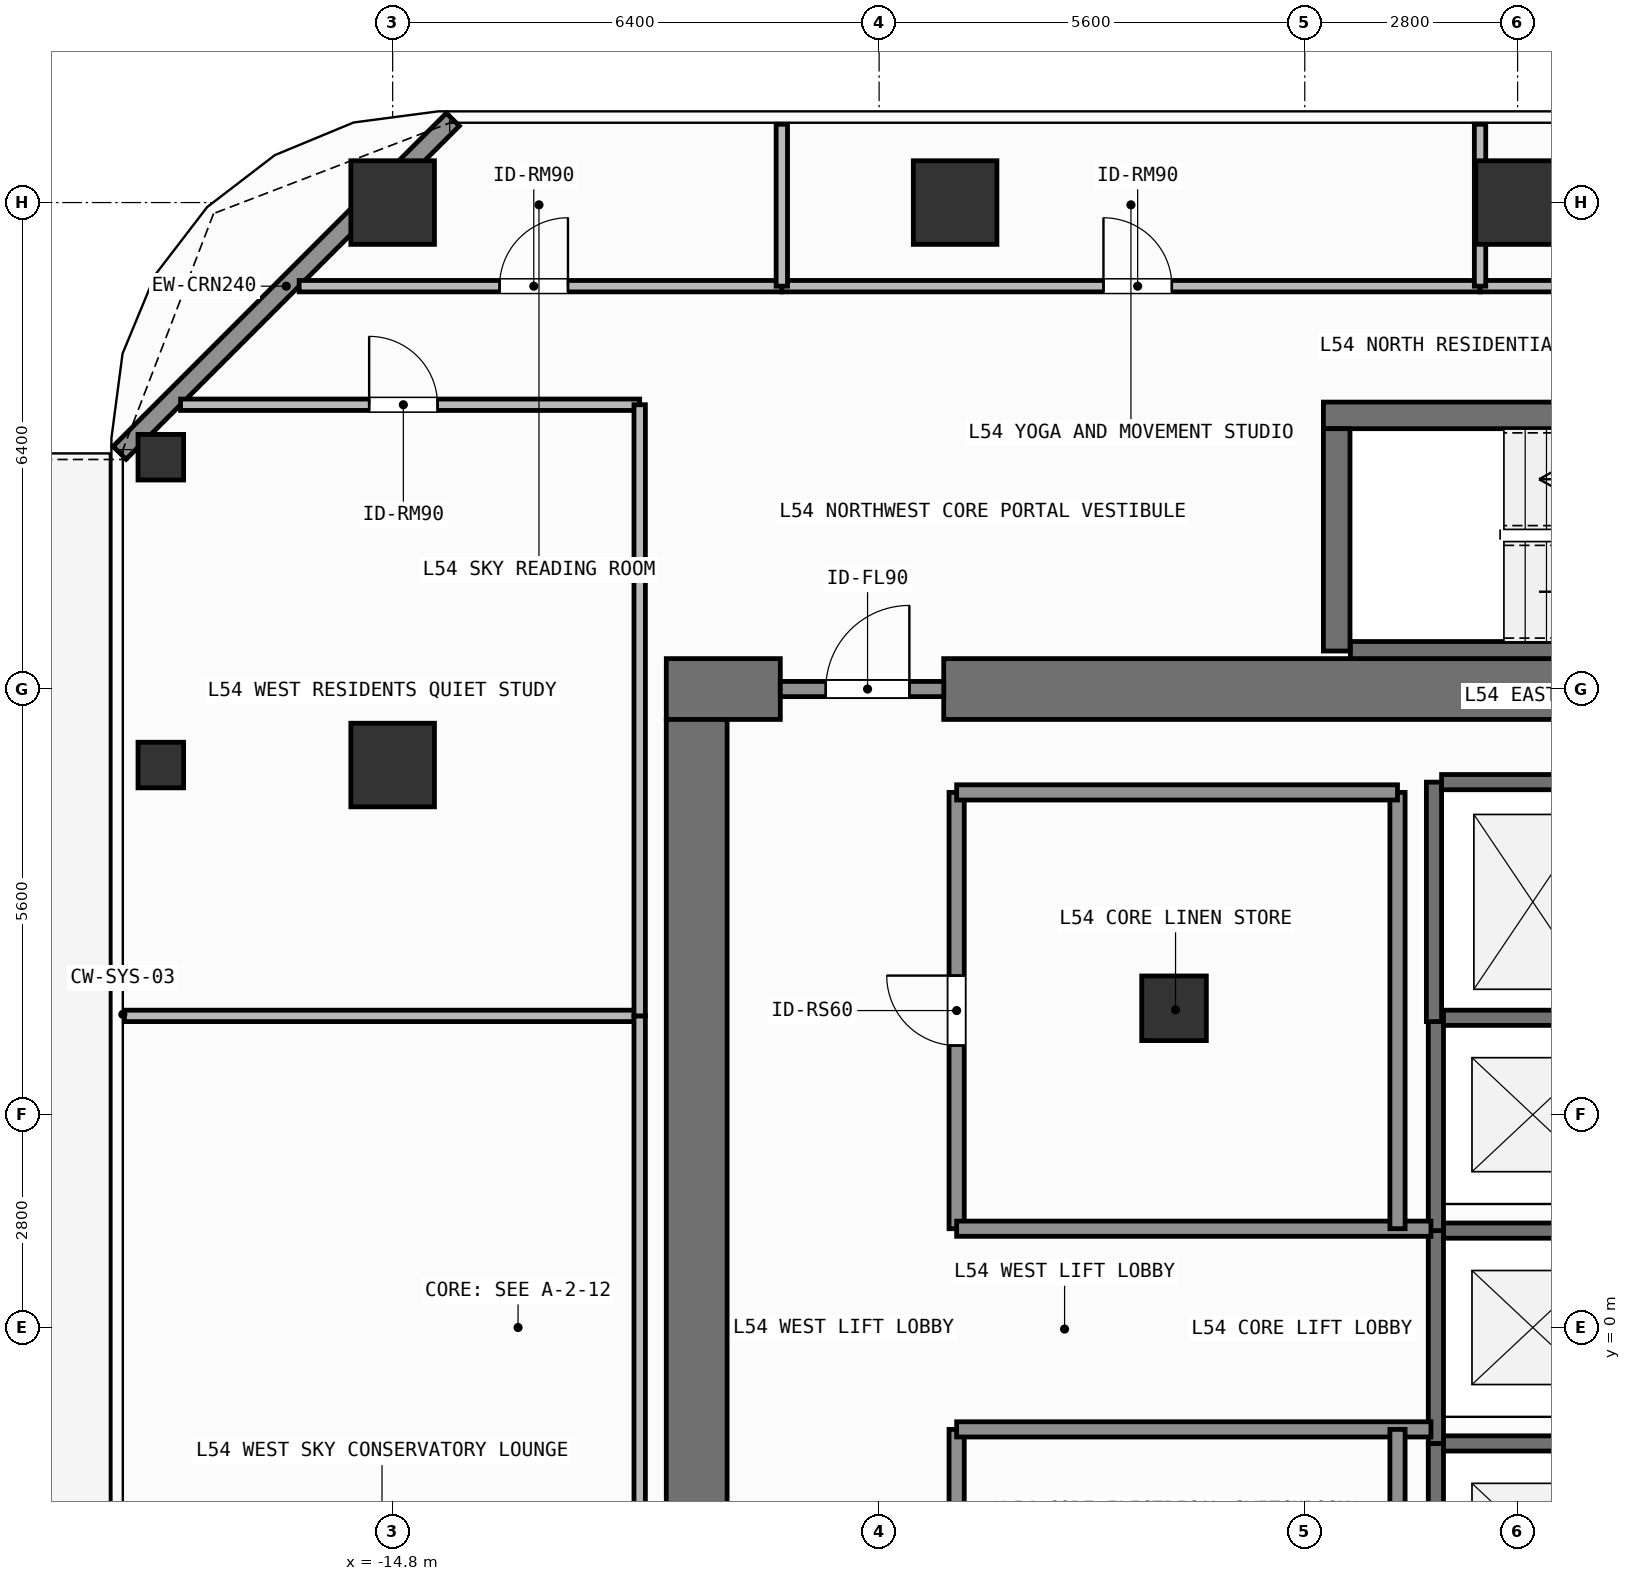
"""IFC4 building model, lengths in metres.
Left out: names, types, materials, properties, quantities, classifications, styles, units other than length and angle.
Written with IfcOpenShell. Run it as: python <this file> out.ifc"""

import sys

from ifc_helpers import new_model, si_unit, direction, frame, frame_2d, origin, origin_2d, place, context, subcontext, project, spatial, rectangle, hollow_rectangle, extrude, element, fill, save


model = new_model("IFC4")
c1 = context("Model", 3, precision=1e-05, world=origin(), true_north=direction((0.0, 1.0)))
c2 = subcontext(c1, "Body", "Model", "MODEL_VIEW")
j1 = project(units=[si_unit("LENGTHUNIT", "METRE"), si_unit("PLANEANGLEUNIT", "RADIAN")], contexts=[c1])
p1 = place(None, origin())
s1 = spatial("IfcSite", under=j1, at=p1, CompositionType="ELEMENT")
p2 = place(p1, origin())
s2 = spatial("IfcBuilding", under=s1, at=p2, CompositionType="ELEMENT")
p3 = place(p2, frame((0.0, 0.0, 219.6)))
s3 = spatial("IfcBuildingStorey", under=s2, at=p3, CompositionType="ELEMENT", Elevation=219.6)
p4 = place(p3, frame((-11.2, 8.4, 0.0), z_axis=(0.0, 0.0, 1.0), x_axis=(1.0, 0.0, 0.0)))
e1 = element("IfcWall", 1, at=p4, inside=s3, PredefinedType="SHEAR", context=c2, shape_type="SweptSolid", body=[
    extrude(rectangle(XDim=1.5, YDim=0.8, at=frame_2d((0.75, 0.0))), origin(), (0.0, 0.0, 1.0), 3.9),
])
p5 = place(p3, frame((-7.55, 8.4, 0.0), z_axis=(0.0, 0.0, 1.0), x_axis=(1.0, 0.0, 0.0)))
e2 = element("IfcWall", 2, at=p5, inside=s3, PredefinedType="SHEAR", context=c2, shape_type="SweptSolid", body=[
    extrude(rectangle(XDim=16.35, YDim=0.8, at=frame_2d((8.175, 0.0))), origin(), (0.0, 0.0, 1.0), 3.9),
])
p6 = place(p3, frame((-10.8, -8.0, 0.0), z_axis=(0.0, 0.0, 1.0), x_axis=(0.0, 1.0, 0.0)))
e3 = element("IfcWall", 3, at=p6, inside=s3, PredefinedType="SHEAR", context=c2, shape_type="SweptSolid", body=[
    extrude(rectangle(XDim=16.0, YDim=0.8, at=frame_2d((8.0, 0.0))), origin(), (0.0, 0.0, 1.0), 3.9),
])
p7 = place(p3, frame((-2.555, 12.0, 0.0), z_axis=(0.0, 0.0, 1.0), x_axis=(1.0, 0.0, 0.0)))
e4 = element("IfcWall", 4, at=p7, inside=s3, PredefinedType="SHEAR", context=c2, shape_type="SweptSolid", body=[
    extrude(rectangle(XDim=7.31, YDim=0.35, at=frame_2d((3.655, 0.0))), origin(), (0.0, 0.0, 1.0), 3.9),
])
p8 = place(p3, frame((-2.2, 8.913, 0.0), z_axis=(0.0, 0.0, 1.0), x_axis=(1.0, 0.0, 0.0)))
e5 = element("IfcWall", 5, at=p8, inside=s3, PredefinedType="SHEAR", context=c2, shape_type="SweptSolid", body=[
    extrude(rectangle(XDim=6.6, YDim=0.225, at=frame_2d((3.3, 0.0))), origin(), (0.0, 0.0, 1.0), 3.9),
])
p9 = place(p3, frame((-2.38, 8.9, 0.0), z_axis=(0.0, 0.0, 1.0), x_axis=(0.0, 1.0, 0.0)))
e6 = element("IfcWall", 6, at=p9, inside=s3, PredefinedType="SHEAR", context=c2, shape_type="SweptSolid", body=[
    extrude(rectangle(XDim=2.925, YDim=0.35, at=frame_2d((1.462, 0.0))), origin(), (0.0, 0.0, 1.0), 3.9),
])
for number, where, z_axis, x_axis in (
    (7, (-14.8, 14.8, 0.0), (0.0, 0.0, 1.0), (1.0, 0.0, 0.0)),
    (8, (-7.4, 14.8, 0.0), (0.0, 0.0, 1.0), (1.0, 0.0, 0.0)),
    (9, (0.0, 14.8, 0.0), (0.0, 0.0, 1.0), (1.0, 0.0, 0.0)),
    (10, (-14.8, 7.4, 0.0), (0.0, 0.0, 1.0), (1.0, 0.0, 0.0)),
):
    element("IfcColumn", number, at=place(p3, frame(where, z_axis=z_axis, x_axis=x_axis)), inside=s3, PredefinedType="COLUMN", context=c2, shape_type="SweptSolid", body=[
        extrude(rectangle(XDim=1.1, YDim=1.1, at=origin_2d()), origin(), (0.0, 0.0, 1.0), 3.9),
    ])
p10 = place(p3, frame((-4.52, 4.2, 0.0), z_axis=(0.0, 0.0, 1.0), x_axis=(1.0, 0.0, 0.0)))
e11 = element("IfcColumn", 11, at=p10, inside=s3, PredefinedType="COLUMN", context=c2, shape_type="SweptSolid", body=[
    extrude(rectangle(XDim=0.85, YDim=0.85, at=origin_2d()), origin(), (0.0, 0.0, 1.0), 3.9),
])
for number, where, z_axis, x_axis in (
    (12, (-17.85, 11.45, 0.0), (0.0, 0.0, 1.0), (1.0, 0.0, 0.0)),
    (13, (-17.85, 7.4, 0.0), (0.0, 0.0, 1.0), (1.0, 0.0, 0.0)),
):
    element("IfcColumn", number, at=place(p3, frame(where, z_axis=z_axis, x_axis=x_axis)), inside=s3, PredefinedType="COLUMN", context=c2, shape_type="SweptSolid", body=[
        extrude(hollow_rectangle(XDim=0.6, YDim=0.6, WallThickness=0.028, at=origin_2d()), origin(), (0.0, 0.0, 1.0), 3.9),
    ])
p11 = place(p3, frame((-18.392, 11.508, 0.0), z_axis=(0.0, 0.0, 1.0), x_axis=(0.707106781187, 0.707106781187, 0.0)))
e14 = element("IfcWall", 14, at=p11, inside=s3, PredefinedType="SOLIDWALL", context=c2, shape_type="SweptSolid", body=[
    extrude(rectangle(XDim=6.201, YDim=0.24, at=frame_2d((3.101, 0.0))), origin(), (0.0, 0.0, 1.0), 3.68),
])
p12 = place(p3, frame((-1.075, -4.275, 0.0), z_axis=(0.0, 0.0, 1.0), x_axis=(0.0, 1.0, 0.0)))
e15 = element("IfcWall", 15, at=p12, inside=s3, PredefinedType="SHEAR", context=c2, shape_type="SweptSolid", body=[
    extrude(rectangle(XDim=2.75, YDim=0.2, at=frame_2d((1.375, 0.0))), origin(), (0.0, 0.0, 1.0), 3.68),
])
p13 = place(p3, frame((-0.975, -1.525, 0.0), z_axis=(0.0, 0.0, 1.0), x_axis=(1.0, 0.0, 0.0)))
e16 = element("IfcWall", 16, at=p13, inside=s3, PredefinedType="SHEAR", context=c2, shape_type="SweptSolid", body=[
    extrude(rectangle(XDim=2.35, YDim=0.2, at=frame_2d((1.175, 0.0))), origin(), (0.0, 0.0, 1.0), 3.68),
])
p14 = place(p3, frame((-1.075, -1.525, 0.0), z_axis=(0.0, 0.0, 1.0), x_axis=(0.0, 1.0, 0.0)))
e17 = element("IfcWall", 17, at=p14, inside=s3, PredefinedType="SHEAR", context=c2, shape_type="SweptSolid", body=[
    extrude(rectangle(XDim=2.8, YDim=0.2, at=frame_2d((1.4, 0.0))), origin(), (0.0, 0.0, 1.0), 3.68),
])
p15 = place(p3, frame((-0.975, 1.275, 0.0), z_axis=(0.0, 0.0, 1.0), x_axis=(1.0, 0.0, 0.0)))
e18 = element("IfcWall", 18, at=p15, inside=s3, PredefinedType="SHEAR", context=c2, shape_type="SweptSolid", body=[
    extrude(rectangle(XDim=2.35, YDim=0.2, at=frame_2d((1.175, 0.0))), origin(), (0.0, 0.0, 1.0), 3.68),
])
p16 = place(p3, frame((-1.075, 1.275, 0.0), z_axis=(0.0, 0.0, 1.0), x_axis=(0.0, 1.0, 0.0)))
e19 = element("IfcWall", 19, at=p16, inside=s3, PredefinedType="SHEAR", context=c2, shape_type="SweptSolid", body=[
    extrude(rectangle(XDim=2.8, YDim=0.2, at=frame_2d((1.4, 0.0))), origin(), (0.0, 0.0, 1.0), 3.68),
])
p17 = place(p3, frame((-0.975, 4.075, 0.0), z_axis=(0.0, 0.0, 1.0), x_axis=(1.0, 0.0, 0.0)))
e20 = element("IfcWall", 20, at=p17, inside=s3, PredefinedType="SHEAR", context=c2, shape_type="SweptSolid", body=[
    extrude(rectangle(XDim=2.35, YDim=0.2, at=frame_2d((1.175, 0.0))), origin(), (0.0, 0.0, 1.0), 3.68),
])
p18 = place(p3, frame((-1.1, 4.025, 0.0), z_axis=(0.0, 0.0, 1.0), x_axis=(0.0, 1.0, 0.0)))
e21 = element("IfcWall", 21, at=p18, inside=s3, PredefinedType="SHEAR", context=c2, shape_type="SweptSolid", body=[
    extrude(rectangle(XDim=3.15, YDim=0.2, at=frame_2d((1.575, 0.0))), origin(), (0.0, 0.0, 1.0), 3.68),
])
p19 = place(p3, frame((-1.0, 7.175, 0.0), z_axis=(0.0, 0.0, 1.0), x_axis=(1.0, 0.0, 0.0)))
e22 = element("IfcWall", 22, at=p19, inside=s3, PredefinedType="SHEAR", context=c2, shape_type="SweptSolid", body=[
    extrude(rectangle(XDim=2.4, YDim=0.2, at=frame_2d((1.2, 0.0))), origin(), (0.0, 0.0, 1.0), 3.68),
])
p20 = place(p3, frame((-9.7, 8.4, 0.0), z_axis=(0.0, 0.0, 1.0), x_axis=(1.0, 0.0, 0.0)))
e23 = element("IfcWall", 23, at=p20, inside=s3, PredefinedType="SOLIDWALL", context=c2, shape_type="SweptSolid", body=[
    extrude(rectangle(XDim=2.15, YDim=0.2, at=frame_2d((1.075, 0.0))), origin(), (0.0, 0.0, 1.0), 2.82),
])
p21 = place(p20, frame((0.598, 0.0, 0.0)))
e24 = element("IfcOpeningElement", 24, at=p21, cuts=e23, PredefinedType="OPENING", context=c2, shape_type="SweptSolid", body=[
    extrude(rectangle(XDim=1.1, YDim=2.15, at=frame_2d((0.55, 1.075))), frame((0.0, 0.11, 0.0), z_axis=(0.0, -1.0, 0.0), x_axis=(1.0, 0.0, 0.0)), (0.0, 0.0, 1.0), 0.22),
])
p22 = place(p3, frame((-7.38, -7.04, 0.0), z_axis=(0.0, 0.0, 1.0), x_axis=(0.0, 1.0, 0.0)))
e25 = element("IfcWall", 25, at=p22, inside=s3, PredefinedType="SOLIDWALL", context=c2, shape_type="SweptSolid", body=[
    extrude(rectangle(XDim=5.7, YDim=0.2, at=frame_2d((2.85, 0.0))), origin(), (0.0, 0.0, 1.0), 3.68),
])
p23 = place(p22, frame((2.301, 0.0, 0.0)))
e26 = element("IfcOpeningElement", 26, at=p23, cuts=e25, PredefinedType="OPENING", context=c2, shape_type="SweptSolid", body=[
    extrude(rectangle(XDim=0.92, YDim=2.1, at=frame_2d((0.46, 1.05))), frame((0.0, 0.11, 0.0), z_axis=(0.0, -1.0, 0.0), x_axis=(1.0, 0.0, 0.0)), (0.0, 0.0, 1.0), 0.22),
])
p24 = place(p3, frame((-7.38, 1.3, 0.0), z_axis=(0.0, 0.0, 1.0), x_axis=(0.0, 1.0, 0.0)))
e27 = element("IfcWall", 27, at=p24, inside=s3, PredefinedType="SOLIDWALL", context=c2, shape_type="SweptSolid", body=[
    extrude(rectangle(XDim=5.74, YDim=0.2, at=frame_2d((2.87, 0.0))), origin(), (0.0, 0.0, 1.0), 3.68),
])
p25 = place(p24, frame((2.41, 0.0, 0.0)))
e28 = element("IfcOpeningElement", 28, at=p25, cuts=e27, PredefinedType="OPENING", context=c2, shape_type="SweptSolid", body=[
    extrude(rectangle(XDim=0.92, YDim=2.1, at=frame_2d((0.46, 1.05))), frame((0.0, 0.11, 0.0), z_axis=(0.0, -1.0, 0.0), x_axis=(1.0, 0.0, 0.0)), (0.0, 0.0, 1.0), 0.22),
])
p26 = place(p3, frame((-16.03, 13.7, 0.0), z_axis=(0.0, 0.0, 1.0), x_axis=(1.0, 0.0, 0.0)))
e29 = element("IfcWall", 29, at=p26, inside=s3, PredefinedType="PARTITIONING", context=c2, shape_type="SweptSolid", body=[
    extrude(rectangle(XDim=6.35, YDim=0.15, at=frame_2d((3.175, 0.0))), origin(), (0.0, 0.0, 1.0), 3.68),
])
p27 = place(p26, frame((2.637, 0.0, 0.0)))
e30 = element("IfcOpeningElement", 30, at=p27, cuts=e29, PredefinedType="OPENING", context=c2, shape_type="SweptSolid", body=[
    extrude(rectangle(XDim=0.9, YDim=2.1, at=frame_2d((0.45, 1.05))), frame((0.0, 0.085, 0.0), z_axis=(0.0, -1.0, 0.0), x_axis=(1.0, 0.0, 0.0)), (0.0, 0.0, 1.0), 0.17),
])
p28 = place(p3, frame((-9.68, 13.7, 0.0), z_axis=(0.0, 0.0, 1.0), x_axis=(1.0, 0.0, 0.0)))
e31 = element("IfcWall", 31, at=p28, inside=s3, PredefinedType="PARTITIONING", context=c2, shape_type="SweptSolid", body=[
    extrude(rectangle(XDim=9.186, YDim=0.15, at=frame_2d((4.593, 0.0))), origin(), (0.0, 0.0, 1.0), 3.68),
])
p29 = place(p28, frame((4.231, 0.0, 0.0)))
e32 = element("IfcOpeningElement", 32, at=p29, cuts=e31, PredefinedType="OPENING", context=c2, shape_type="SweptSolid", body=[
    extrude(rectangle(XDim=0.9, YDim=2.1, at=frame_2d((0.45, 1.05))), frame((0.0, 0.085, 0.0), z_axis=(0.0, -1.0, 0.0), x_axis=(1.0, 0.0, 0.0)), (0.0, 0.0, 1.0), 0.17),
])
p30 = place(p3, frame((-0.494, 13.7, 0.0), z_axis=(0.0, 0.0, 1.0), x_axis=(1.0, 0.0, 0.0)))
e33 = element("IfcWall", 33, at=p30, inside=s3, PredefinedType="PARTITIONING", context=c2, shape_type="SweptSolid", body=[
    extrude(rectangle(XDim=11.583, YDim=0.15, at=frame_2d((5.792, 0.0))), origin(), (0.0, 0.0, 1.0), 3.68),
])
p31 = place(p30, frame((5.342, 0.0, 0.0)))
e34 = element("IfcOpeningElement", 34, at=p31, cuts=e33, PredefinedType="OPENING", context=c2, shape_type="SweptSolid", body=[
    extrude(rectangle(XDim=0.9, YDim=2.1, at=frame_2d((0.45, 1.05))), frame((0.0, 0.085, 0.0), z_axis=(0.0, -1.0, 0.0), x_axis=(1.0, 0.0, 0.0)), (0.0, 0.0, 1.0), 0.17),
])
p32 = place(p3, frame((-17.59, 12.14, 0.0), z_axis=(0.0, 0.0, 1.0), x_axis=(1.0, 0.0, 0.0)))
e35 = element("IfcWall", 35, at=p32, inside=s3, PredefinedType="PARTITIONING", context=c2, shape_type="SweptSolid", body=[
    extrude(rectangle(XDim=6.04, YDim=0.15, at=frame_2d((3.02, 0.0))), origin(), (0.0, 0.0, 1.0), 3.68),
])
p33 = place(p32, frame((2.481, 0.0, 0.0)))
e36 = element("IfcOpeningElement", 36, at=p33, cuts=e35, PredefinedType="OPENING", context=c2, shape_type="SweptSolid", body=[
    extrude(rectangle(XDim=0.9, YDim=2.1, at=frame_2d((0.45, 1.05))), frame((0.0, 0.085, 0.0), z_axis=(0.0, -1.0, 0.0), x_axis=(1.0, 0.0, 0.0)), (0.0, 0.0, 1.0), 0.17),
])
for number, where, z_axis, x_axis in (
    (37, (-7.38, -1.34, 0.0), (0.0, 0.0, 1.0), (1.0, 0.0, 0.0)),
    (38, (-7.38, 1.3, 0.0), (0.0, 0.0, 1.0), (1.0, 0.0, 0.0)),
):
    element("IfcWall", number, at=place(p3, frame(where, z_axis=z_axis, x_axis=x_axis)), inside=s3, PredefinedType="SOLIDWALL", context=c2, shape_type="SweptSolid", body=[
        extrude(rectangle(XDim=6.24, YDim=0.2, at=frame_2d((3.12, 0.0))), origin(), (0.0, 0.0, 1.0), 3.68),
    ])
p34 = place(p3, frame((-1.58, -7.04, 0.0), z_axis=(0.0, 0.0, 1.0), x_axis=(0.0, 1.0, 0.0)))
e39 = element("IfcWall", 39, at=p34, inside=s3, PredefinedType="SOLIDWALL", context=c2, shape_type="SweptSolid", body=[
    extrude(rectangle(XDim=5.7, YDim=0.2, at=frame_2d((2.85, 0.0))), origin(), (0.0, 0.0, 1.0), 3.68),
])
p35 = place(p3, frame((-1.58, 1.3, 0.0), z_axis=(0.0, 0.0, 1.0), x_axis=(0.0, 1.0, 0.0)))
e40 = element("IfcWall", 40, at=p35, inside=s3, PredefinedType="SOLIDWALL", context=c2, shape_type="SweptSolid", body=[
    extrude(rectangle(XDim=5.74, YDim=0.2, at=frame_2d((2.87, 0.0))), origin(), (0.0, 0.0, 1.0), 3.68),
])
p36 = place(p3, frame((-7.38, 7.04, 0.0), z_axis=(0.0, 0.0, 1.0), x_axis=(1.0, 0.0, 0.0)))
e41 = element("IfcWall", 41, at=p36, inside=s3, PredefinedType="SOLIDWALL", context=c2, shape_type="SweptSolid", body=[
    extrude(rectangle(XDim=5.8, YDim=0.2, at=frame_2d((2.9, 0.0))), origin(), (0.0, 0.0, 1.0), 3.68),
])
for number, where, z_axis, x_axis in (
    (42, (-9.68, 13.7, 0.0), (0.0, 0.0, 1.0), (0.0, 1.0, 0.0)),
    (43, (-0.494, 13.7, 0.0), (0.0, 0.0, 1.0), (0.0, 1.0, 0.0)),
):
    element("IfcWall", number, at=place(p3, frame(where, z_axis=z_axis, x_axis=x_axis)), inside=s3, PredefinedType="PARTITIONING", context=c2, shape_type="SweptSolid", body=[
        extrude(rectangle(XDim=2.13, YDim=0.15, at=frame_2d((1.065, 0.0))), origin(), (0.0, 0.0, 1.0), 3.68),
    ])
p37 = place(p3, frame((-18.33, 4.1, 0.0), z_axis=(0.0, 0.0, 1.0), x_axis=(1.0, 0.0, 0.0)))
e44 = element("IfcWall", 44, at=p37, inside=s3, PredefinedType="PARTITIONING", context=c2, shape_type="SweptSolid", body=[
    extrude(rectangle(XDim=6.78, YDim=0.15, at=frame_2d((3.39, 0.0))), origin(), (0.0, 0.0, 1.0), 3.68),
])
p38 = place(p3, frame((-11.55, -12.14, 0.0), z_axis=(0.0, 0.0, 1.0), x_axis=(0.0, 1.0, 0.0)))
e45 = element("IfcWall", 45, at=p38, inside=s3, PredefinedType="PARTITIONING", context=c2, shape_type="SweptSolid", body=[
    extrude(rectangle(XDim=16.24, YDim=0.15, at=frame_2d((8.12, 0.0))), origin(), (0.0, 0.0, 1.0), 3.68),
])
p39 = place(p3, frame((-11.55, 4.1, 0.0), z_axis=(0.0, 0.0, 1.0), x_axis=(0.0, 1.0, 0.0)))
e46 = element("IfcWall", 46, at=p39, inside=s3, PredefinedType="PARTITIONING", context=c2, shape_type="SweptSolid", body=[
    extrude(rectangle(XDim=8.04, YDim=0.15, at=frame_2d((4.02, 0.0))), origin(), (0.0, 0.0, 1.0), 3.68),
])
p40 = place(p21, origin())
e47 = element("IfcDoor", 47, at=p40, inside=s3, OperationType="SINGLE_SWING_RIGHT", PredefinedType="DOOR", context=c2, shape_type="SweptSolid", body=[
    extrude(rectangle(XDim=1.1, YDim=2.15, at=frame_2d((0.55, 1.075))), frame((0.0, 0.025, 0.0), z_axis=(0.0, -1.0, 0.0), x_axis=(1.0, 0.0, 0.0)), (0.0, 0.0, 1.0), 0.05),
])
fill(e24, e47)
p41 = place(p25, origin())
e48 = element("IfcDoor", 48, at=p41, inside=s3, OperationType="SINGLE_SWING_RIGHT", PredefinedType="DOOR", context=c2, shape_type="SweptSolid", body=[
    extrude(rectangle(XDim=0.92, YDim=2.1, at=frame_2d((0.46, 1.05))), frame((0.0, 0.025, 0.0), z_axis=(0.0, -1.0, 0.0), x_axis=(1.0, 0.0, 0.0)), (0.0, 0.0, 1.0), 0.05),
])
fill(e28, e48)
p42 = place(p27, origin())
e49 = element("IfcDoor", 49, at=p42, inside=s3, OperationType="SINGLE_SWING_RIGHT", PredefinedType="DOOR", context=c2, shape_type="SweptSolid", body=[
    extrude(rectangle(XDim=0.9, YDim=2.1, at=frame_2d((0.45, 1.05))), frame((0.0, 0.025, 0.0), z_axis=(0.0, -1.0, 0.0), x_axis=(1.0, 0.0, 0.0)), (0.0, 0.0, 1.0), 0.05),
])
fill(e30, e49)
p43 = place(p29, origin())
e50 = element("IfcDoor", 50, at=p43, inside=s3, OperationType="SINGLE_SWING_LEFT", PredefinedType="DOOR", context=c2, shape_type="SweptSolid", body=[
    extrude(rectangle(XDim=0.9, YDim=2.1, at=frame_2d((0.45, 1.05))), frame((0.0, 0.025, 0.0), z_axis=(0.0, -1.0, 0.0), x_axis=(1.0, 0.0, 0.0)), (0.0, 0.0, 1.0), 0.05),
])
fill(e32, e50)
p44 = place(p33, origin())
e51 = element("IfcDoor", 51, at=p44, inside=s3, OperationType="SINGLE_SWING_LEFT", PredefinedType="DOOR", context=c2, shape_type="SweptSolid", body=[
    extrude(rectangle(XDim=0.9, YDim=2.1, at=frame_2d((0.45, 1.05))), frame((0.0, 0.025, 0.0), z_axis=(0.0, -1.0, 0.0), x_axis=(1.0, 0.0, 0.0)), (0.0, 0.0, 1.0), 0.05),
])
fill(e36, e51)
save(model, sys.argv[1])
